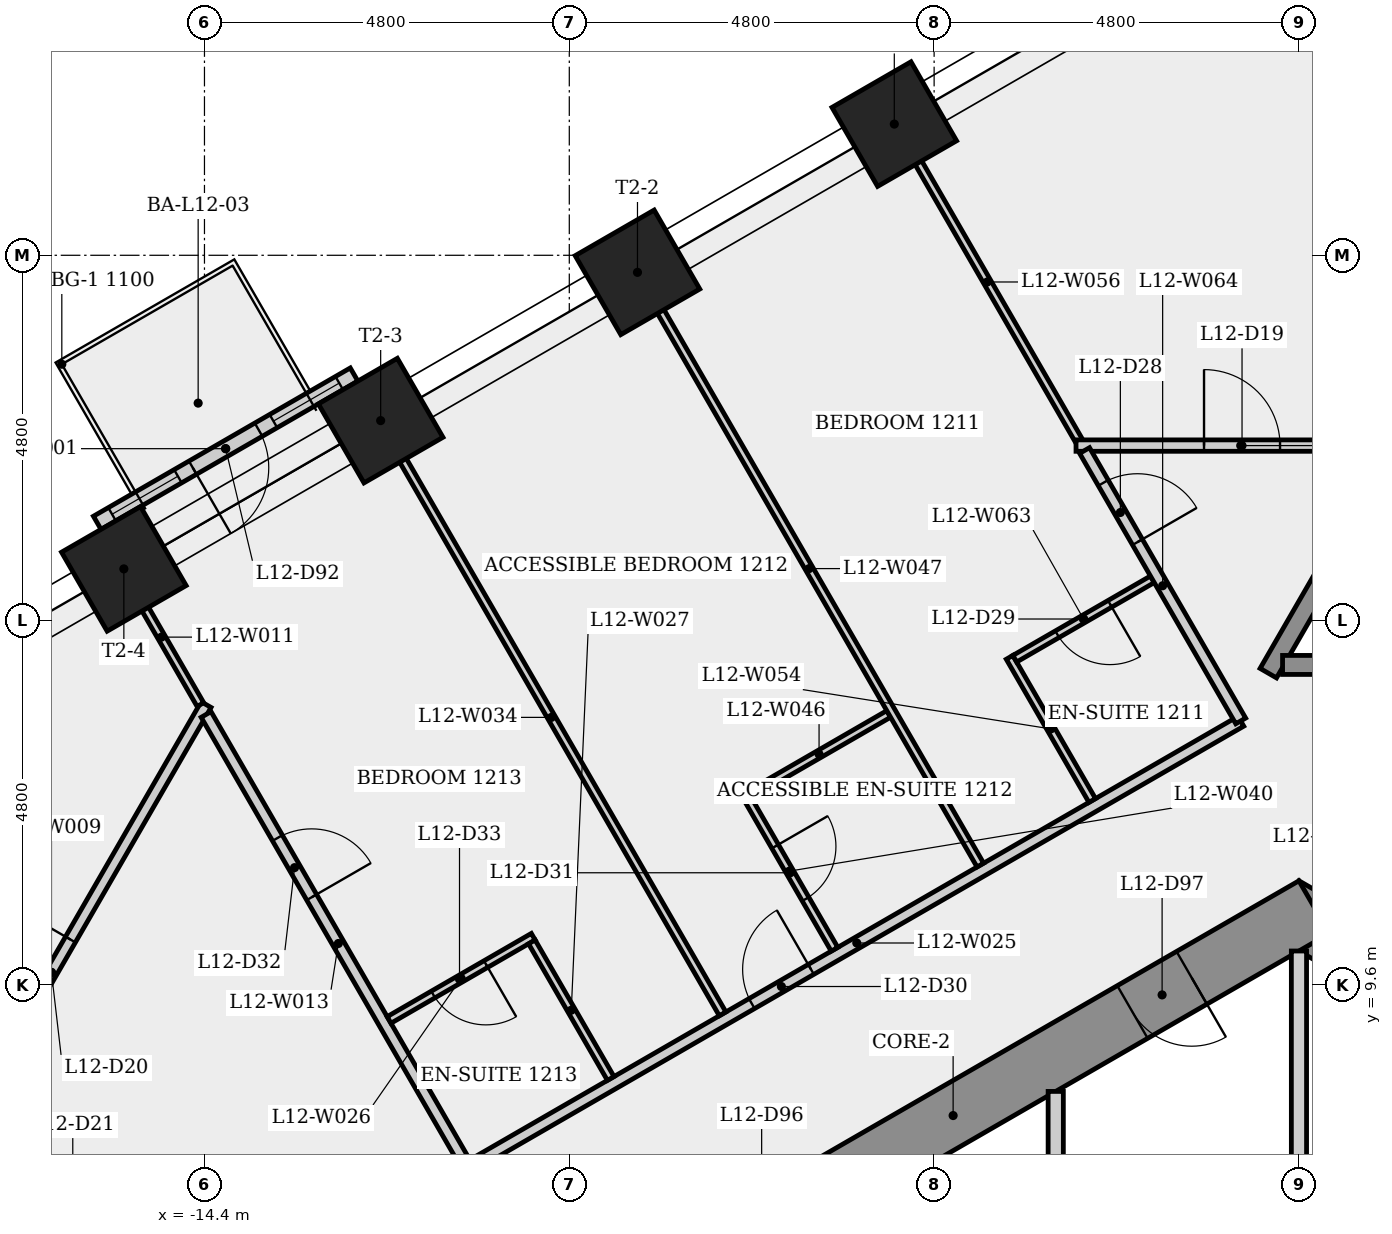
"""IFC4 building model, lengths in metres.
Left out: names, types, materials, properties, quantities, classifications, styles, units other than length and angle.
Written with IfcOpenShell. Run it as: python <this file> out.ifc"""

import sys

from ifc_helpers import new_model, si_unit, direction, frame, frame_2d, origin, origin_2d, place, context, subcontext, project, spatial, rectangle, extrude, element, fill, save


model = new_model("IFC4")
c1 = context("Model", 3, precision=1e-05, world=origin(), true_north=direction((0.0, 1.0)))
c2 = subcontext(c1, "Body", "Model", "MODEL_VIEW")
j1 = project(units=[si_unit("LENGTHUNIT", "METRE"), si_unit("PLANEANGLEUNIT", "RADIAN")], contexts=[c1])
p1 = place(None, origin())
s1 = spatial("IfcSite", under=j1, at=p1, CompositionType="ELEMENT")
p2 = place(p1, origin())
s2 = spatial("IfcBuilding", under=s1, at=p2, CompositionType="ELEMENT")
p3 = place(p2, frame((0.0, 0.0, 49.3)))
s3 = spatial("IfcBuildingStorey", under=s2, at=p3, CompositionType="ELEMENT", Elevation=49.3)
p4 = place(p3, frame((9.3, 5.138, 0.0), z_axis=(0.0, 0.0, 1.0), x_axis=(-0.866023993627, 0.500002442456, 0.0)))
e1 = element("IfcWall", 1, at=p4, inside=s3, PredefinedType="SHEAR", context=c2, shape_type="SweptSolid", body=[
    extrude(rectangle(XDim=10.97, YDim=0.8, at=frame_2d((5.485, 0.0))), origin(), (0.0, 0.0, 1.0), 3.4),
])
p5 = place(p4, frame((8.326, 0.0, 0.0)))
e2 = element("IfcOpeningElement", 2, at=p5, cuts=e1, PredefinedType="OPENING", context=c2, shape_type="SweptSolid", body=[
    extrude(rectangle(XDim=0.9, YDim=2.1, at=frame_2d((0.45, 1.05))), frame((0.0, 0.41, 0.0), z_axis=(0.0, -1.0, 0.0), x_axis=(1.0, 0.0, 0.0)), (0.0, 0.0, 1.0), 0.82),
])
p6 = place(p4, frame((2.091, 0.0, 0.0)))
e3 = element("IfcOpeningElement", 3, at=p6, cuts=e1, PredefinedType="OPENING", context=c2, shape_type="SweptSolid", body=[
    extrude(rectangle(XDim=0.9, YDim=2.1, at=frame_2d((0.45, 1.05))), frame((0.0, 0.41, 0.0), z_axis=(0.0, -1.0, 0.0), x_axis=(1.0, 0.0, 0.0)), (0.0, 0.0, 1.0), 0.82),
])
p7 = place(p3, frame((0.2, 10.623, 0.0), z_axis=(0.0, 0.0, 1.0), x_axis=(-0.866023993627, -0.500002442456, 0.0)))
e4 = element("IfcWall", 4, at=p7, inside=s3, PredefinedType="SHEAR", context=c2, shape_type="SweptSolid", body=[
    extrude(rectangle(XDim=10.97, YDim=0.8, at=frame_2d((5.485, 0.0))), origin(), (0.0, 0.0, 1.0), 3.4),
])
p8 = place(p7, frame((7.944, 0.0, 0.0)))
e5 = element("IfcOpeningElement", 5, at=p8, cuts=e4, PredefinedType="OPENING", context=c2, shape_type="SweptSolid", body=[
    extrude(rectangle(XDim=0.9, YDim=2.1, at=frame_2d((0.45, 1.05))), frame((0.0, 0.41, 0.0), z_axis=(0.0, -1.0, 0.0), x_axis=(1.0, 0.0, 0.0)), (0.0, 0.0, 1.0), 0.82),
])
p9 = place(p7, frame((1.86, 0.0, 0.0)))
e6 = element("IfcOpeningElement", 6, at=p9, cuts=e4, PredefinedType="OPENING", context=c2, shape_type="SweptSolid", body=[
    extrude(rectangle(XDim=0.9, YDim=2.1, at=frame_2d((0.45, 1.05))), frame((0.0, 0.41, 0.0), z_axis=(0.0, -1.0, 0.0), x_axis=(1.0, 0.0, 0.0)), (0.0, 0.0, 1.0), 0.82),
])
for number, where, z_axis, x_axis in (
    (7, (-5.324, 20.926, 0.0), (0.0, 0.0, 1.0), (-0.5, 0.866, 0.0)),
    (8, (-8.703, 18.975, 0.0), (0.0, 0.0, 1.0), (-0.5, 0.866, 0.0)),
    (9, (-12.082, 17.025, 0.0), (0.0, 0.0, 1.0), (-0.5, 0.866, 0.0)),
    (10, (-15.461, 15.074, 0.0), (0.0, 0.0, 1.0), (-0.5, 0.866, 0.0)),
):
    element("IfcColumn", number, at=place(p3, frame(where, z_axis=z_axis, x_axis=x_axis)), inside=s3, PredefinedType="COLUMN", context=c2, shape_type="SweptSolid", body=[
        extrude(rectangle(XDim=1.2, YDim=1.2, at=origin_2d()), origin(), (0.0, 0.0, 1.0), 3.4),
    ])
p10 = place(p3, frame((-12.432, 17.631, 0.0), z_axis=(0.0, 0.0, 1.0), x_axis=(-0.866028250644, -0.499995069063, 0.0)))
e11 = element("IfcWall", 11, at=p10, inside=s3, PredefinedType="SOLIDWALL", context=c2, shape_type="SweptSolid", body=[
    extrude(rectangle(XDim=3.902, YDim=0.2, at=frame_2d((1.951, 0.0))), origin(), (0.0, 0.0, 1.0), 3.4),
])
p11 = place(p10, frame((1.451, 0.0, 0.0)))
e12 = element("IfcOpeningElement", 12, at=p11, cuts=e11, PredefinedType="OPENING", context=c2, shape_type="SweptSolid", body=[
    extrude(rectangle(XDim=1.0, YDim=2.4, at=frame_2d((0.5, 1.2))), frame((0.0, 0.11, 0.0), z_axis=(0.0, -1.0, 0.0), x_axis=(1.0, 0.0, 0.0)), (0.0, 0.0, 1.0), 0.22),
])
p12 = place(p10, frame((0.226, 0.0, 0.9)))
e13 = element("IfcOpeningElement", 13, at=p12, cuts=e11, PredefinedType="OPENING", context=c2, shape_type="SweptSolid", body=[
    extrude(rectangle(XDim=1.0, YDim=1.5, at=frame_2d((0.5, 0.75))), frame((0.0, 0.11, 0.0), z_axis=(0.0, -1.0, 0.0), x_axis=(1.0, 0.0, 0.0)), (0.0, 0.0, 1.0), 0.22),
])
p13 = place(p10, frame((2.677, 0.0, 0.9)))
e14 = element("IfcOpeningElement", 14, at=p13, cuts=e11, PredefinedType="OPENING", context=c2, shape_type="SweptSolid", body=[
    extrude(rectangle(XDim=1.0, YDim=1.5, at=frame_2d((0.5, 0.75))), frame((0.0, 0.11, 0.0), z_axis=(0.0, -1.0, 0.0), x_axis=(1.0, 0.0, 0.0)), (0.0, 0.0, 1.0), 0.22),
])
p14 = place(p3, frame((-18.448, 6.24, 0.0), z_axis=(0.0, 0.0, 1.0), x_axis=(0.499997699084, 0.866026732215, 0.0)))
e15 = element("IfcWall", 15, at=p14, inside=s3, PredefinedType="PARTITIONING", context=c2, shape_type="SweptSolid", body=[
    extrude(rectangle(XDim=8.139, YDim=0.15, at=frame_2d((4.069, 0.0))), origin(), (0.0, 0.0, 1.0), 3.05),
])
p15 = place(p14, frame((3.569, 0.0, 0.0)))
e16 = element("IfcOpeningElement", 16, at=p15, cuts=e15, PredefinedType="OPENING", context=c2, shape_type="SweptSolid", body=[
    extrude(rectangle(XDim=1.0, YDim=2.1, at=frame_2d((0.5, 1.05))), frame((0.0, 0.085, 0.0), z_axis=(0.0, -1.0, 0.0), x_axis=(1.0, 0.0, 0.0)), (0.0, 0.0, 1.0), 0.17),
])
p16 = place(p3, frame((-15.479, 15.063, 0.0), z_axis=(0.0, 0.0, 1.0), x_axis=(0.500045446624, -0.865999163574, 0.0)))
e17 = element("IfcWall", 17, at=p16, inside=s3, PredefinedType="PARTITIONING", context=c2, shape_type="SweptSolid", body=[
    extrude(rectangle(XDim=2.05, YDim=0.1, at=frame_2d((1.025, 0.0))), origin(), (0.0, 0.0, 1.0), 3.05),
])
p17 = place(p3, frame((-14.378, 13.158, 0.0), z_axis=(0.0, 0.0, 1.0), x_axis=(0.499998787219, -0.866026103983, 0.0)))
e18 = element("IfcWall", 18, at=p17, inside=s3, PredefinedType="PARTITIONING", context=c2, shape_type="SweptSolid", body=[
    extrude(rectangle(XDim=6.959, YDim=0.15, at=frame_2d((3.48, 0.0))), origin(), (0.0, 0.0, 1.0), 3.05),
])
p18 = place(p17, frame((1.877, 0.0, 0.0)))
e19 = element("IfcOpeningElement", 19, at=p18, cuts=e18, PredefinedType="OPENING", context=c2, shape_type="SweptSolid", body=[
    extrude(rectangle(XDim=0.9, YDim=2.1, at=frame_2d((0.45, 1.05))), frame((0.0, 0.085, 0.0), z_axis=(0.0, -1.0, 0.0), x_axis=(1.0, 0.0, 0.0)), (0.0, 0.0, 1.0), 0.17),
])
p19 = place(p3, frame((-10.871, 7.233, 0.0), z_axis=(0.0, 0.0, 1.0), x_axis=(0.866013843593, 0.500020022305, 0.0)))
e20 = element("IfcWall", 20, at=p19, inside=s3, PredefinedType="PARTITIONING", context=c2, shape_type="SweptSolid", body=[
    extrude(rectangle(XDim=11.671, YDim=0.15, at=frame_2d((5.835, 0.0))), origin(), (0.0, 0.0, 1.0), 3.05),
])
p20 = place(p19, frame((4.24, 0.0, 0.0)))
e21 = element("IfcOpeningElement", 21, at=p20, cuts=e20, PredefinedType="OPENING", context=c2, shape_type="SweptSolid", body=[
    extrude(rectangle(XDim=0.9, YDim=2.1, at=frame_2d((0.45, 1.05))), frame((0.0, 0.085, 0.0), z_axis=(0.0, -1.0, 0.0), x_axis=(1.0, 0.0, 0.0)), (0.0, 0.0, 1.0), 0.17),
])
p21 = place(p3, frame((-10.074, 10.234, 0.0), z_axis=(0.0, 0.0, 1.0), x_axis=(-0.866074224396, -0.499915430684, 0.0)))
e22 = element("IfcWall", 22, at=p21, inside=s3, PredefinedType="PARTITIONING", context=c2, shape_type="SweptSolid", body=[
    extrude(rectangle(XDim=2.19, YDim=0.1, at=frame_2d((1.095, 0.0))), origin(), (0.0, 0.0, 1.0), 3.05),
])
p22 = place(p21, frame((0.72, 0.0, 0.0)))
e23 = element("IfcOpeningElement", 23, at=p22, cuts=e22, PredefinedType="OPENING", context=c2, shape_type="SweptSolid", body=[
    extrude(rectangle(XDim=0.8, YDim=2.1, at=frame_2d((0.4, 1.05))), frame((0.0, 0.06, 0.0), z_axis=(0.0, -1.0, 0.0), x_axis=(1.0, 0.0, 0.0)), (0.0, 0.0, 1.0), 0.12),
])
p23 = place(p3, frame((-9.055, 8.369, 0.0), z_axis=(0.0, 0.0, 1.0), x_axis=(-0.499973702503, 0.866040586119, 0.0)))
e24 = element("IfcWall", 24, at=p23, inside=s3, PredefinedType="PARTITIONING", context=c2, shape_type="SweptSolid", body=[
    extrude(rectangle(XDim=2.075, YDim=0.1, at=frame_2d((1.037, 0.0))), origin(), (0.0, 0.0, 1.0), 3.05),
])
p24 = place(p3, frame((-7.583, 9.219, 0.0), z_axis=(0.0, 0.0, 1.0), x_axis=(-0.499977347544, 0.866038481791, 0.0)))
e25 = element("IfcWall", 25, at=p24, inside=s3, PredefinedType="PARTITIONING", context=c2, shape_type="SweptSolid", body=[
    extrude(rectangle(XDim=9.01, YDim=0.1, at=frame_2d((4.505, 0.0))), origin(), (0.0, 0.0, 1.0), 3.05),
])
p25 = place(p3, frame((-7.298, 12.125, 0.0), z_axis=(0.0, 0.0, 1.0), x_axis=(0.499986429846, -0.866033238375, 0.0)))
e26 = element("IfcWall", 26, at=p25, inside=s3, PredefinedType="PARTITIONING", context=c2, shape_type="SweptSolid", body=[
    extrude(rectangle(XDim=2.375, YDim=0.1, at=frame_2d((1.188, 0.0))), origin(), (0.0, 0.0, 1.0), 3.05),
])
p26 = place(p25, frame((0.812, 0.0, 0.0)))
e27 = element("IfcOpeningElement", 27, at=p26, cuts=e26, PredefinedType="OPENING", context=c2, shape_type="SweptSolid", body=[
    extrude(rectangle(XDim=0.8, YDim=2.1, at=frame_2d((0.4, 1.05))), frame((0.0, 0.06, 0.0), z_axis=(0.0, -1.0, 0.0), x_axis=(1.0, 0.0, 0.0)), (0.0, 0.0, 1.0), 0.12),
])
p27 = place(p3, frame((-5.398, 13.165, 0.0), z_axis=(0.0, 0.0, 1.0), x_axis=(-0.86601836006, -0.500012199891, 0.0)))
e28 = element("IfcWall", 28, at=p27, inside=s3, PredefinedType="PARTITIONING", context=c2, shape_type="SweptSolid", body=[
    extrude(rectangle(XDim=2.115, YDim=0.1, at=frame_2d((1.058, 0.0))), origin(), (0.0, 0.0, 1.0), 3.05),
])
p28 = place(p3, frame((-8.697, 18.979, 0.0), z_axis=(0.0, 0.0, 1.0), x_axis=(0.500009404554, -0.866019973994, 0.0)))
e29 = element("IfcWall", 29, at=p28, inside=s3, PredefinedType="PARTITIONING", context=c2, shape_type="SweptSolid", body=[
    extrude(rectangle(XDim=9.01, YDim=0.1, at=frame_2d((4.505, 0.0))), origin(), (0.0, 0.0, 1.0), 3.05),
])
p29 = place(p3, frame((-3.807, 13.91, 0.0), z_axis=(0.0, 0.0, 1.0), x_axis=(0.499978335414, -0.866037911478, 0.0)))
e30 = element("IfcWall", 30, at=p29, inside=s3, PredefinedType="PARTITIONING", context=c2, shape_type="SweptSolid", body=[
    extrude(rectangle(XDim=2.175, YDim=0.1, at=frame_2d((1.087, 0.0))), origin(), (0.0, 0.0, 1.0), 3.05),
])
p30 = place(p3, frame((-3.2, 8.198, 0.0), z_axis=(0.0, 0.0, 1.0), x_axis=(0.0, -1.0, 0.0)))
e31 = element("IfcWall", 31, at=p30, inside=s3, PredefinedType="PARTITIONING", context=c2, shape_type="SweptSolid", body=[
    extrude(rectangle(XDim=2.924, YDim=0.2, at=frame_2d((1.462, 0.0))), origin(), (0.0, 0.0, 1.0), 3.05),
])
p31 = place(p3, frame((-2.896, 16.761, 0.0), z_axis=(0.0, 0.0, 1.0), x_axis=(-0.49998398663, 0.86603464891, 0.0)))
e32 = element("IfcWall", 32, at=p31, inside=s3, PredefinedType="PARTITIONING", context=c2, shape_type="SweptSolid", body=[
    extrude(rectangle(XDim=4.822, YDim=0.1, at=frame_2d((2.411, 0.0))), origin(), (0.0, 0.0, 1.0), 3.05),
])
p32 = place(p3, frame((-2.933, 16.696, 0.0), z_axis=(0.0, 0.0, 1.0), x_axis=(1.0, 0.0, 0.0)))
e33 = element("IfcWall", 33, at=p32, inside=s3, PredefinedType="PARTITIONING", context=c2, shape_type="SweptSolid", body=[
    extrude(rectangle(XDim=4.334, YDim=0.15, at=frame_2d((2.167, 0.0))), origin(), (0.0, 0.0, 1.0), 3.05),
])
p33 = place(p32, frame((1.684, 0.0, 0.0)))
e34 = element("IfcOpeningElement", 34, at=p33, cuts=e33, PredefinedType="OPENING", context=c2, shape_type="SweptSolid", body=[
    extrude(rectangle(XDim=1.0, YDim=2.1, at=frame_2d((0.5, 1.05))), frame((0.0, 0.085, 0.0), z_axis=(0.0, -1.0, 0.0), x_axis=(1.0, 0.0, 0.0)), (0.0, 0.0, 1.0), 0.17),
])
p34 = place(p3, frame((-1.929, 14.937, 0.0), z_axis=(0.0, 0.0, 1.0), x_axis=(-0.866028046028, -0.499995423472, 0.0)))
e35 = element("IfcWall", 35, at=p34, inside=s3, PredefinedType="PARTITIONING", context=c2, shape_type="SweptSolid", body=[
    extrude(rectangle(XDim=2.09, YDim=0.1, at=frame_2d((1.045, 0.0))), origin(), (0.0, 0.0, 1.0), 3.05),
])
p35 = place(p34, frame((0.645, 0.0, 0.0)))
e36 = element("IfcOpeningElement", 36, at=p35, cuts=e35, PredefinedType="OPENING", context=c2, shape_type="SweptSolid", body=[
    extrude(rectangle(XDim=0.8, YDim=2.1, at=frame_2d((0.4, 1.05))), frame((0.0, 0.06, 0.0), z_axis=(0.0, -1.0, 0.0), x_axis=(1.0, 0.0, 0.0)), (0.0, 0.0, 1.0), 0.12),
])
p36 = place(p3, frame((-2.821, 16.631, 0.0), z_axis=(0.0, 0.0, 1.0), x_axis=(0.500031070095, -0.866007464714, 0.0)))
e37 = element("IfcWall", 37, at=p36, inside=s3, PredefinedType="PARTITIONING", context=c2, shape_type="SweptSolid", body=[
    extrude(rectangle(XDim=4.109, YDim=0.15, at=frame_2d((2.054, 0.0))), origin(), (0.0, 0.0, 1.0), 3.05),
])
p37 = place(p36, frame((0.492, 0.0, 0.0)))
e38 = element("IfcOpeningElement", 38, at=p37, cuts=e37, PredefinedType="OPENING", context=c2, shape_type="SweptSolid", body=[
    extrude(rectangle(XDim=0.9, YDim=2.1, at=frame_2d((0.45, 1.05))), frame((0.0, 0.085, 0.0), z_axis=(0.0, -1.0, 0.0), x_axis=(1.0, 0.0, 0.0)), (0.0, 0.0, 1.0), 0.17),
])
p38 = place(p3, frame((-0.403, 13.702, 0.0), z_axis=(0.0, 0.0, 1.0), x_axis=(0.499976111731, 0.866039195244, 0.0)))
e39 = element("IfcWall", 39, at=p38, inside=s3, PredefinedType="SHEAR", context=c2, shape_type="SweptSolid", body=[
    extrude(rectangle(XDim=2.861, YDim=0.25, at=frame_2d((1.43, 0.0))), origin(), (0.0, 0.0, 1.0), 3.05),
])
p39 = place(p3, frame((0.0, 10.046, 0.0), z_axis=(0.0, 0.0, 1.0), x_axis=(0.0, -1.0, 0.0)))
e40 = element("IfcWall", 40, at=p39, inside=s3, PredefinedType="PARTITIONING", context=c2, shape_type="SweptSolid", body=[
    extrude(rectangle(XDim=4.771, YDim=0.2, at=frame_2d((2.385, 0.0))), origin(), (0.0, 0.0, 1.0), 3.05),
])
p40 = place(p3, frame((0.475, 13.81, 0.0), z_axis=(0.0, 0.0, 1.0), x_axis=(-1.0, 0.0, 0.0)))
e41 = element("IfcWall", 41, at=p40, inside=s3, PredefinedType="SHEAR", context=c2, shape_type="SweptSolid", body=[
    extrude(rectangle(XDim=0.691, YDim=0.25, at=frame_2d((0.345, 0.0))), origin(), (0.0, 0.0, 1.0), 3.4),
])
p41 = place(p11, origin())
e42 = element("IfcDoor", 42, at=p41, inside=s3, OperationType="SINGLE_SWING_RIGHT", PredefinedType="DOOR", context=c2, shape_type="SweptSolid", body=[
    extrude(rectangle(XDim=1.0, YDim=2.4, at=frame_2d((0.5, 1.2))), frame((0.0, 0.025, 0.0), z_axis=(0.0, -1.0, 0.0), x_axis=(1.0, 0.0, 0.0)), (0.0, 0.0, 1.0), 0.05),
])
fill(e12, e42)
p42 = place(p12, origin())
e43 = element("IfcWindow", 43, at=p42, inside=s3, PartitioningType="SINGLE_PANEL", PredefinedType="WINDOW", context=c2, shape_type="SweptSolid", body=[
    extrude(rectangle(XDim=1.0, YDim=1.5, at=frame_2d((0.5, 0.75))), frame((0.0, 0.03, 0.0), z_axis=(0.0, -1.0, 0.0), x_axis=(1.0, 0.0, 0.0)), (0.0, 0.0, 1.0), 0.06),
])
fill(e13, e43)
p43 = place(p13, origin())
e44 = element("IfcWindow", 44, at=p43, inside=s3, PartitioningType="SINGLE_PANEL", PredefinedType="WINDOW", context=c2, shape_type="SweptSolid", body=[
    extrude(rectangle(XDim=1.0, YDim=1.5, at=frame_2d((0.5, 0.75))), frame((0.0, 0.03, 0.0), z_axis=(0.0, -1.0, 0.0), x_axis=(1.0, 0.0, 0.0)), (0.0, 0.0, 1.0), 0.06),
])
fill(e14, e44)
p44 = place(p33, origin())
e45 = element("IfcDoor", 45, at=p44, inside=s3, OperationType="SINGLE_SWING_LEFT", PredefinedType="DOOR", context=c2, shape_type="SweptSolid", body=[
    extrude(rectangle(XDim=1.0, YDim=2.1, at=frame_2d((0.5, 1.05))), frame((0.0, 0.025, 0.0), z_axis=(0.0, -1.0, 0.0), x_axis=(1.0, 0.0, 0.0)), (0.0, 0.0, 1.0), 0.05),
])
fill(e34, e45)
p45 = place(p15, origin())
e46 = element("IfcDoor", 46, at=p45, inside=s3, OperationType="SINGLE_SWING_RIGHT", PredefinedType="DOOR", context=c2, shape_type="SweptSolid", body=[
    extrude(rectangle(XDim=1.0, YDim=2.1, at=frame_2d((0.5, 1.05))), frame((0.0, 0.025, 0.0), z_axis=(0.0, -1.0, 0.0), x_axis=(1.0, 0.0, 0.0)), (0.0, 0.0, 1.0), 0.05),
])
fill(e16, e46)
p46 = place(p37, origin())
e47 = element("IfcDoor", 47, at=p46, inside=s3, OperationType="SINGLE_SWING_RIGHT", PredefinedType="DOOR", context=c2, shape_type="SweptSolid", body=[
    extrude(rectangle(XDim=0.9, YDim=2.1, at=frame_2d((0.45, 1.05))), frame((0.0, 0.025, 0.0), z_axis=(0.0, -1.0, 0.0), x_axis=(1.0, 0.0, 0.0)), (0.0, 0.0, 1.0), 0.05),
])
fill(e38, e47)
p47 = place(p35, origin())
e48 = element("IfcDoor", 48, at=p47, inside=s3, OperationType="SINGLE_SWING_LEFT", PredefinedType="DOOR", context=c2, shape_type="SweptSolid", body=[
    extrude(rectangle(XDim=0.8, YDim=2.1, at=frame_2d((0.4, 1.05))), frame((0.0, 0.025, 0.0), z_axis=(0.0, -1.0, 0.0), x_axis=(1.0, 0.0, 0.0)), (0.0, 0.0, 1.0), 0.05),
])
fill(e36, e48)
p48 = place(p20, origin())
e49 = element("IfcDoor", 49, at=p48, inside=s3, OperationType="SINGLE_SWING_RIGHT", PredefinedType="DOOR", context=c2, shape_type="SweptSolid", body=[
    extrude(rectangle(XDim=0.9, YDim=2.1, at=frame_2d((0.45, 1.05))), frame((0.0, 0.025, 0.0), z_axis=(0.0, -1.0, 0.0), x_axis=(1.0, 0.0, 0.0)), (0.0, 0.0, 1.0), 0.05),
])
fill(e21, e49)
p49 = place(p26, origin())
e50 = element("IfcDoor", 50, at=p49, inside=s3, OperationType="SINGLE_SWING_LEFT", PredefinedType="DOOR", context=c2, shape_type="SweptSolid", body=[
    extrude(rectangle(XDim=0.8, YDim=2.1, at=frame_2d((0.4, 1.05))), frame((0.0, 0.025, 0.0), z_axis=(0.0, -1.0, 0.0), x_axis=(1.0, 0.0, 0.0)), (0.0, 0.0, 1.0), 0.05),
])
fill(e27, e50)
p50 = place(p18, origin())
e51 = element("IfcDoor", 51, at=p50, inside=s3, OperationType="SINGLE_SWING_RIGHT", PredefinedType="DOOR", context=c2, shape_type="SweptSolid", body=[
    extrude(rectangle(XDim=0.9, YDim=2.1, at=frame_2d((0.45, 1.05))), frame((0.0, 0.025, 0.0), z_axis=(0.0, -1.0, 0.0), x_axis=(1.0, 0.0, 0.0)), (0.0, 0.0, 1.0), 0.05),
])
fill(e19, e51)
p51 = place(p22, origin())
e52 = element("IfcDoor", 52, at=p51, inside=s3, OperationType="SINGLE_SWING_LEFT", PredefinedType="DOOR", context=c2, shape_type="SweptSolid", body=[
    extrude(rectangle(XDim=0.8, YDim=2.1, at=frame_2d((0.4, 1.05))), frame((0.0, 0.025, 0.0), z_axis=(0.0, -1.0, 0.0), x_axis=(1.0, 0.0, 0.0)), (0.0, 0.0, 1.0), 0.05),
])
fill(e23, e52)
p52 = place(p9, origin())
e53 = element("IfcDoor", 53, at=p52, inside=s3, OperationType="SINGLE_SWING_LEFT", PredefinedType="DOOR", context=c2, shape_type="SweptSolid", body=[
    extrude(rectangle(XDim=0.9, YDim=2.1, at=frame_2d((0.45, 1.05))), frame((0.0, 0.025, 0.0), z_axis=(0.0, -1.0, 0.0), x_axis=(1.0, 0.0, 0.0)), (0.0, 0.0, 1.0), 0.05),
])
fill(e6, e53)
save(model, sys.argv[1])
